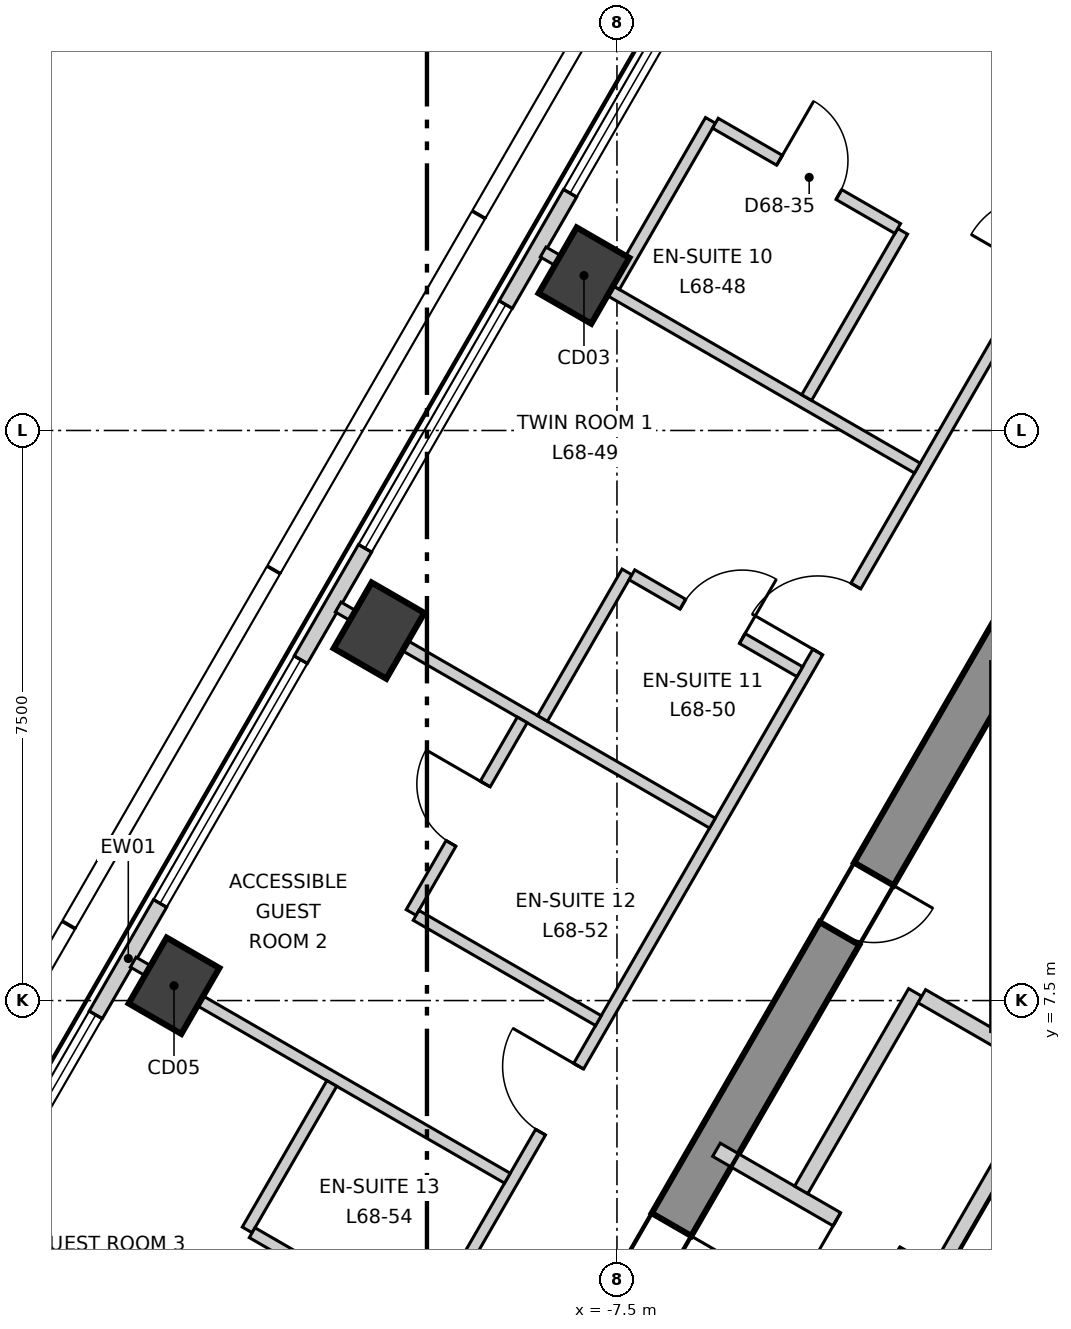
"""IFC4 building model, lengths in metres.
Left out: names, types, materials, properties, quantities, classifications, styles, units other than length and angle.
Written with IfcOpenShell. Run it as: python <this file> out.ifc"""

import sys

from ifc_helpers import new_model, si_unit, direction, frame, frame_2d, origin, origin_2d, place, context, subcontext, project, spatial, polyline, rectangle, outline, extrude, element, fill, save


model = new_model("IFC4")
c1 = context("Model", 3, precision=1e-05, world=origin(), true_north=direction((0.0, 1.0)))
c2 = subcontext(c1, "Body", "Model", "MODEL_VIEW")
j1 = project(units=[si_unit("LENGTHUNIT", "METRE"), si_unit("PLANEANGLEUNIT", "RADIAN")], contexts=[c1])
p1 = place(None, origin())
s1 = spatial("IfcSite", under=j1, at=p1, CompositionType="ELEMENT")
p2 = place(p1, origin())
s2 = spatial("IfcBuilding", under=s1, at=p2, CompositionType="ELEMENT")
p3 = place(p2, frame((0.0, 0.0, 289.9)))
s3 = spatial("IfcBuildingStorey", under=s2, at=p3, CompositionType="ELEMENT", Elevation=289.9)
p4 = place(p3, frame((-1.732, 13.3, -0.3), z_axis=(0.0, 0.0, 1.0), x_axis=(-0.500000539815, -0.866025092122, 0.0)))
e1 = element("IfcWall", 1, at=p4, inside=s3, PredefinedType="SHEAR", context=c2, shape_type="SweptSolid", body=[
    extrude(outline(polyline([(-0.173, -0.3), (1.795, -0.3), (3.763, -0.3), (5.732, -0.3), (7.7, -0.3), (9.668, -0.301), (11.637, -0.301), (13.605, -0.301), (15.573, -0.301), (17.542, -0.301), (19.51, -0.301), (21.478, -0.301), (21.131, 0.3), (19.226, 0.3), (17.321, 0.3), (15.415, 0.3), (13.51, 0.3), (11.605, 0.3), (9.699, 0.3), (7.794, 0.3), (5.889, 0.3), (3.984, 0.3), (2.078, 0.3), (0.173, 0.3), (-0.173, -0.3)])), origin(), (0.0, 0.0, 1.0), 3.6),
])
p5 = place(p4, frame((10.102, 0.0, 0.3)))
e2 = element("IfcOpeningElement", 2, at=p5, cuts=e1, PredefinedType="OPENING", context=c2, shape_type="SweptSolid", body=[
    extrude(rectangle(XDim=1.1, YDim=2.1, at=frame_2d((0.55, 1.05))), frame((0.0, 0.31, 0.0), z_axis=(0.0, -1.0, 0.0), x_axis=(1.0, 0.0, 0.0)), (0.0, 0.0, 1.0), 0.621),
])
p6 = place(p4, frame((16.328, 0.0, 0.3)))
e3 = element("IfcOpeningElement", 3, at=p6, cuts=e1, PredefinedType="OPENING", context=c2, shape_type="SweptSolid", body=[
    extrude(rectangle(XDim=1.0, YDim=2.1, at=frame_2d((0.5, 1.05))), frame((0.0, 0.31, 0.0), z_axis=(0.0, -1.0, 0.0), x_axis=(1.0, 0.0, 0.0)), (0.0, 0.0, 1.0), 0.621),
])
p7 = place(p4, frame((4.777, 0.0, 0.3)))
e4 = element("IfcOpeningElement", 4, at=p7, cuts=e1, PredefinedType="OPENING", context=c2, shape_type="SweptSolid", body=[
    extrude(rectangle(XDim=0.9, YDim=2.1, at=frame_2d((0.45, 1.05))), frame((0.0, 0.31, 0.0), z_axis=(0.0, -1.0, 0.0), x_axis=(1.0, 0.0, 0.0)), (0.0, 0.0, 1.0), 0.621),
])
for number, where, z_axis, x_axis in (
    (5, (-7.934, 17.038, -0.3), (0.0, 0.0, 1.0), (0.5, 0.866, 0.0)),
    (6, (-10.631, 12.367, -0.3), (0.0, 0.0, 1.0), (0.5, 0.866, 0.0)),
    (7, (-13.328, 7.695, -0.3), (0.0, 0.0, 1.0), (0.5, 0.866, 0.0)),
):
    element("IfcColumn", number, at=place(p3, frame(where, z_axis=z_axis, x_axis=x_axis)), inside=s3, PredefinedType="COLUMN", context=c2, shape_type="SweptSolid", body=[
        extrude(rectangle(XDim=1.0, YDim=0.8, at=origin_2d()), origin(), (0.0, 0.0, 1.0), 3.6),
    ])
p8 = place(p3, frame((-2.494, 27.86, 0.0), z_axis=(0.0, 0.0, 1.0), x_axis=(-0.500008134474, -0.866020707292, 0.0)))
e8 = element("IfcWall", 8, at=p8, inside=s3, PredefinedType="ELEMENTEDWALL", context=c2, shape_type="SweptSolid", body=[
    extrude(rectangle(XDim=45.741, YDim=0.2, at=frame_2d((22.871, 0.0))), origin(), (0.0, 0.0, 1.0), 3.3),
])
p9 = place(p8, frame((2.15, 0.0, 0.9)))
e9 = element("IfcOpeningElement", 9, at=p9, cuts=e8, PredefinedType="OPENING", context=c2, shape_type="SweptSolid", body=[
    extrude(rectangle(XDim=3.7, YDim=2.2, at=frame_2d((1.85, 1.1))), frame((0.0, 0.11, 0.0), z_axis=(0.0, -1.0, 0.0), x_axis=(1.0, 0.0, 0.0)), (0.0, 0.0, 1.0), 0.22),
])
p10 = place(p8, frame((7.544, 0.0, 0.9)))
e10 = element("IfcOpeningElement", 10, at=p10, cuts=e8, PredefinedType="OPENING", context=c2, shape_type="SweptSolid", body=[
    extrude(rectangle(XDim=3.7, YDim=2.2, at=frame_2d((1.85, 1.1))), frame((0.0, 0.11, 0.0), z_axis=(0.0, -1.0, 0.0), x_axis=(1.0, 0.0, 0.0)), (0.0, 0.0, 1.0), 0.22),
])
p11 = place(p8, frame((12.939, 0.0, 0.9)))
e11 = element("IfcOpeningElement", 11, at=p11, cuts=e8, PredefinedType="OPENING", context=c2, shape_type="SweptSolid", body=[
    extrude(rectangle(XDim=3.7, YDim=2.2, at=frame_2d((1.85, 1.1))), frame((0.0, 0.11, 0.0), z_axis=(0.0, -1.0, 0.0), x_axis=(1.0, 0.0, 0.0)), (0.0, 0.0, 1.0), 0.22),
])
p12 = place(p8, frame((18.333, 0.0, 0.9)))
e12 = element("IfcOpeningElement", 12, at=p12, cuts=e8, PredefinedType="OPENING", context=c2, shape_type="SweptSolid", body=[
    extrude(rectangle(XDim=3.7, YDim=2.2, at=frame_2d((1.85, 1.1))), frame((0.0, 0.11, 0.0), z_axis=(0.0, -1.0, 0.0), x_axis=(1.0, 0.0, 0.0)), (0.0, 0.0, 1.0), 0.22),
])
p13 = place(p8, frame((23.728, 0.0, 0.9)))
e13 = element("IfcOpeningElement", 13, at=p13, cuts=e8, PredefinedType="OPENING", context=c2, shape_type="SweptSolid", body=[
    extrude(rectangle(XDim=3.7, YDim=2.2, at=frame_2d((1.85, 1.1))), frame((0.0, 0.11, 0.0), z_axis=(0.0, -1.0, 0.0), x_axis=(1.0, 0.0, 0.0)), (0.0, 0.0, 1.0), 0.22),
])
p14 = place(p8, frame((29.122, 0.0, 0.9)))
e14 = element("IfcOpeningElement", 14, at=p14, cuts=e8, PredefinedType="OPENING", context=c2, shape_type="SweptSolid", body=[
    extrude(rectangle(XDim=3.7, YDim=2.2, at=frame_2d((1.85, 1.1))), frame((0.0, 0.11, 0.0), z_axis=(0.0, -1.0, 0.0), x_axis=(1.0, 0.0, 0.0)), (0.0, 0.0, 1.0), 0.22),
])
p15 = place(p8, frame((34.517, 0.0, 0.9)))
e15 = element("IfcOpeningElement", 15, at=p15, cuts=e8, PredefinedType="OPENING", context=c2, shape_type="SweptSolid", body=[
    extrude(rectangle(XDim=3.7, YDim=2.2, at=frame_2d((1.85, 1.1))), frame((0.0, 0.11, 0.0), z_axis=(0.0, -1.0, 0.0), x_axis=(1.0, 0.0, 0.0)), (0.0, 0.0, 1.0), 0.22),
])
p16 = place(p8, frame((39.911, 0.0, 0.9)))
e16 = element("IfcOpeningElement", 16, at=p16, cuts=e8, PredefinedType="OPENING", context=c2, shape_type="SweptSolid", body=[
    extrude(rectangle(XDim=3.7, YDim=2.2, at=frame_2d((1.85, 1.1))), frame((0.0, 0.11, 0.0), z_axis=(0.0, -1.0, 0.0), x_axis=(1.0, 0.0, 0.0)), (0.0, 0.0, 1.0), 0.22),
])
p17 = place(p3, frame((-17.679, -10.12, 0.0), z_axis=(0.0, 0.0, 1.0), x_axis=(0.500008955215, 0.866020233427, 0.0)))
e17 = element("IfcWall", 17, at=p17, inside=s3, PredefinedType="PARTITIONING", context=c2, shape_type="SweptSolid", body=[
    extrude(rectangle(XDim=35.357, YDim=0.15, at=frame_2d((17.679, 0.0))), origin(), (0.0, 0.0, 1.0), 3.3),
])
p18 = place(p17, frame((31.407, 0.0, 0.0)))
e18 = element("IfcOpeningElement", 18, at=p18, cuts=e17, PredefinedType="OPENING", context=c2, shape_type="SweptSolid", body=[
    extrude(rectangle(XDim=1.0, YDim=2.1, at=frame_2d((0.5, 1.05))), frame((0.0, 0.085, 0.0), z_axis=(0.0, -1.0, 0.0), x_axis=(1.0, 0.0, 0.0)), (0.0, 0.0, 1.0), 0.17),
])
p19 = place(p17, frame((25.642, 0.0, 0.0)))
e19 = element("IfcOpeningElement", 19, at=p19, cuts=e17, PredefinedType="OPENING", context=c2, shape_type="SweptSolid", body=[
    extrude(rectangle(XDim=1.0, YDim=2.1, at=frame_2d((0.5, 1.05))), frame((0.0, 0.085, 0.0), z_axis=(0.0, -1.0, 0.0), x_axis=(1.0, 0.0, 0.0)), (0.0, 0.0, 1.0), 0.17),
])
p20 = place(p17, frame((18.348, 0.0, 0.0)))
e20 = element("IfcOpeningElement", 20, at=p20, cuts=e17, PredefinedType="OPENING", context=c2, shape_type="SweptSolid", body=[
    extrude(rectangle(XDim=1.0, YDim=2.1, at=frame_2d((0.5, 1.05))), frame((0.0, 0.085, 0.0), z_axis=(0.0, -1.0, 0.0), x_axis=(1.0, 0.0, 0.0)), (0.0, 0.0, 1.0), 0.17),
])
p21 = place(p17, frame((13.254, 0.0, 0.0)))
e21 = element("IfcOpeningElement", 21, at=p21, cuts=e17, PredefinedType="OPENING", context=c2, shape_type="SweptSolid", body=[
    extrude(rectangle(XDim=1.0, YDim=2.1, at=frame_2d((0.5, 1.05))), frame((0.0, 0.085, 0.0), z_axis=(0.0, -1.0, 0.0), x_axis=(1.0, 0.0, 0.0)), (0.0, 0.0, 1.0), 0.17),
])
p22 = place(p17, frame((7.559, 0.0, 0.0)))
e22 = element("IfcOpeningElement", 22, at=p22, cuts=e17, PredefinedType="OPENING", context=c2, shape_type="SweptSolid", body=[
    extrude(rectangle(XDim=1.0, YDim=2.1, at=frame_2d((0.5, 1.05))), frame((0.0, 0.085, 0.0), z_axis=(0.0, -1.0, 0.0), x_axis=(1.0, 0.0, 0.0)), (0.0, 0.0, 1.0), 0.17),
])
p23 = place(p17, frame((2.865, 0.0, 0.0)))
e23 = element("IfcOpeningElement", 23, at=p23, cuts=e17, PredefinedType="OPENING", context=c2, shape_type="SweptSolid", body=[
    extrude(rectangle(XDim=1.0, YDim=2.1, at=frame_2d((0.5, 1.05))), frame((0.0, 0.085, 0.0), z_axis=(0.0, -1.0, 0.0), x_axis=(1.0, 0.0, 0.0)), (0.0, 0.0, 1.0), 0.17),
])
p24 = place(p3, frame((-13.865, 8.005, 0.0), z_axis=(0.0, 0.0, 1.0), x_axis=(0.86606758311, -0.499926936147, 0.0)))
e24 = element("IfcWall", 24, at=p24, inside=s3, PredefinedType="PARTITIONING", context=c2, shape_type="SweptSolid", body=[
    extrude(rectangle(XDim=5.684, YDim=0.15, at=frame_2d((2.842, 0.0))), origin(), (0.0, 0.0, 1.0), 2.8),
])
p25 = place(p3, frame((-11.168, 12.677, 0.0), z_axis=(0.0, 0.0, 1.0), x_axis=(0.866017549727, -0.50001360338, 0.0)))
e25 = element("IfcWall", 25, at=p25, inside=s3, PredefinedType="PARTITIONING", context=c2, shape_type="SweptSolid", body=[
    extrude(rectangle(XDim=5.686, YDim=0.15, at=frame_2d((2.843, 0.0))), origin(), (0.0, 0.0, 1.0), 3.3),
])
p26 = place(p3, frame((-8.471, 17.348, 0.0), z_axis=(0.0, 0.0, 1.0), x_axis=(0.86596385927, -0.500106583079, 0.0)))
e26 = element("IfcWall", 26, at=p26, inside=s3, PredefinedType="PARTITIONING", context=c2, shape_type="SweptSolid", body=[
    extrude(rectangle(XDim=5.685, YDim=0.15, at=frame_2d((2.842, 0.0))), origin(), (0.0, 0.0, 1.0), 3.3),
])
p27 = place(p3, frame((-5.004, 15.433, 0.0), z_axis=(0.0, 0.0, 1.0), x_axis=(0.500079482444, 0.865979509711, 0.0)))
e27 = element("IfcWall", 27, at=p27, inside=s3, PredefinedType="PARTITIONING", context=c2, shape_type="SweptSolid", body=[
    extrude(rectangle(XDim=2.525, YDim=0.15, at=frame_2d((1.263, 0.0))), origin(), (0.0, 0.0, 1.0), 3.3),
])
p28 = place(p3, frame((-7.533, 16.893, 0.0), z_axis=(0.0, 0.0, 1.0), x_axis=(0.500079482444, 0.865979509711, 0.0)))
e28 = element("IfcWall", 28, at=p28, inside=s3, PredefinedType="PARTITIONING", context=c2, shape_type="SweptSolid", body=[
    extrude(rectangle(XDim=2.525, YDim=0.15, at=frame_2d((1.263, 0.0))), origin(), (0.0, 0.0, 1.0), 2.6),
])
p29 = place(p3, frame((-10.208, 8.659, 0.0), z_axis=(0.0, 0.0, 1.0), x_axis=(0.499874209568, 0.866098016745, 0.0)))
e29 = element("IfcWall", 29, at=p29, inside=s3, PredefinedType="PARTITIONING", context=c2, shape_type="SweptSolid", body=[
    extrude(rectangle(XDim=2.925, YDim=0.15, at=frame_2d((1.462, 0.0))), origin(), (0.0, 0.0, 1.0), 3.3),
])
p30 = place(p29, frame((1.05, 0.0, 0.0)))
e30 = element("IfcOpeningElement", 30, at=p30, cuts=e29, PredefinedType="OPENING", context=c2, shape_type="SweptSolid", body=[
    extrude(rectangle(XDim=0.9, YDim=2.1, at=frame_2d((0.45, 1.05))), frame((0.0, 0.085, 0.0), z_axis=(0.0, -1.0, 0.0), x_axis=(1.0, 0.0, 0.0)), (0.0, 0.0, 1.0), 0.17),
])
p31 = place(p3, frame((-12.365, 4.483, 0.0), z_axis=(0.0, 0.0, 1.0), x_axis=(0.500162441854, 0.865931597621, 0.0)))
e31 = element("IfcWall", 31, at=p31, inside=s3, PredefinedType="PARTITIONING", context=c2, shape_type="SweptSolid", body=[
    extrude(rectangle(XDim=2.225, YDim=0.15, at=frame_2d((1.113, 0.0))), origin(), (0.0, 0.0, 1.0), 3.3),
])
p32 = place(p3, frame((-8.48, 11.212, 0.0), z_axis=(0.0, 0.0, 1.0), x_axis=(0.499833278392, 0.866121639155, 0.0)))
e32 = element("IfcWall", 32, at=p32, inside=s3, PredefinedType="PARTITIONING", context=c2, shape_type="SweptSolid", body=[
    extrude(rectangle(XDim=2.225, YDim=0.15, at=frame_2d((1.112, 0.0))), origin(), (0.0, 0.0, 1.0), 3.3),
])
p33 = place(p3, frame((-12.3, 4.446, 0.0), z_axis=(0.0, 0.0, 1.0), x_axis=(0.865965520905, -0.500103705848, 0.0)))
e33 = element("IfcWall", 33, at=p33, inside=s3, PredefinedType="PARTITIONING", context=c2, shape_type="SweptSolid", body=[
    extrude(rectangle(XDim=2.55, YDim=0.15, at=frame_2d((1.275, 0.0))), origin(), (0.0, 0.0, 1.0), 3.3),
])
p34 = place(p33, frame((0.875, 0.0, 0.0)))
e34 = element("IfcOpeningElement", 34, at=p34, cuts=e33, PredefinedType="OPENING", context=c2, shape_type="SweptSolid", body=[
    extrude(rectangle(XDim=0.9, YDim=2.1, at=frame_2d((0.45, 1.05))), frame((0.0, 0.085, 0.0), z_axis=(0.0, -1.0, 0.0), x_axis=(1.0, 0.0, 0.0)), (0.0, 0.0, 1.0), 0.17),
])
p35 = place(p3, frame((-10.143, 8.621, 0.0), z_axis=(0.0, 0.0, 1.0), x_axis=(0.866049104564, -0.499958946799, 0.0)))
e35 = element("IfcWall", 35, at=p35, inside=s3, PredefinedType="PARTITIONING", context=c2, shape_type="SweptSolid", body=[
    extrude(rectangle(XDim=2.77, YDim=0.15, at=frame_2d((1.385, 0.0))), origin(), (0.0, 0.0, 1.0), 3.3),
])
p36 = place(p3, frame((-6.205, 19.042, 0.0), z_axis=(0.0, 0.0, 1.0), x_axis=(0.866049104564, -0.499958946799, 0.0)))
e36 = element("IfcWall", 36, at=p36, inside=s3, PredefinedType="PARTITIONING", context=c2, shape_type="SweptSolid", body=[
    extrude(rectangle(XDim=2.77, YDim=0.15, at=frame_2d((1.385, 0.0))), origin(), (0.0, 0.0, 1.0), 3.3),
])
p37 = place(p36, frame((0.975, 0.0, 0.0)))
e37 = element("IfcOpeningElement", 37, at=p37, cuts=e36, PredefinedType="OPENING", context=c2, shape_type="SweptSolid", body=[
    extrude(rectangle(XDim=0.9, YDim=2.1, at=frame_2d((0.45, 1.05))), frame((0.0, 0.085, 0.0), z_axis=(0.0, -1.0, 0.0), x_axis=(1.0, 0.0, 0.0)), (0.0, 0.0, 1.0), 0.17),
])
p38 = place(p3, frame((-7.303, 13.101, 0.0), z_axis=(0.0, 0.0, 1.0), x_axis=(0.866061263272, -0.499937884402, 0.0)))
e38 = element("IfcWall", 38, at=p38, inside=s3, PredefinedType="PARTITIONING", context=c2, shape_type="SweptSolid", body=[
    extrude(rectangle(XDim=2.551, YDim=0.15, at=frame_2d((1.275, 0.0))), origin(), (0.0, 0.0, 1.0), 3.3),
])
p39 = place(p38, frame((0.775, 0.0, 0.0)))
e39 = element("IfcOpeningElement", 39, at=p39, cuts=e38, PredefinedType="OPENING", context=c2, shape_type="SweptSolid", body=[
    extrude(rectangle(XDim=0.9, YDim=2.1, at=frame_2d((0.45, 1.05))), frame((0.0, 0.085, 0.0), z_axis=(0.0, -1.0, 0.0), x_axis=(1.0, 0.0, 0.0)), (0.0, 0.0, 1.0), 0.17),
])
p40 = place(p3, frame((-6.191, 5.537, 0.0), z_axis=(0.0, 0.0, 1.0), x_axis=(0.866052607023, -0.499952879648, 0.0)))
e40 = element("IfcWall", 40, at=p40, inside=s3, PredefinedType="SOLIDWALL", context=c2, shape_type="SweptSolid", body=[
    extrude(rectangle(XDim=3.332, YDim=0.2, at=frame_2d((1.666, 0.0))), origin(), (0.0, 0.0, 1.0), 3.3),
])
p41 = place(p40, frame((1.83, 0.0, 0.0)))
e41 = element("IfcOpeningElement", 41, at=p41, cuts=e40, PredefinedType="OPENING", context=c2, shape_type="SweptSolid", body=[
    extrude(rectangle(XDim=0.9, YDim=2.1, at=frame_2d((0.45, 1.05))), frame((0.0, 0.11, 0.0), z_axis=(0.0, -1.0, 0.0), x_axis=(1.0, 0.0, 0.0)), (0.0, 0.0, 1.0), 0.22),
])
p42 = place(p3, frame((-5.076, 5.009, 0.0), z_axis=(0.0, 0.0, 1.0), x_axis=(0.50002537861, 0.866010750942, 0.0)))
e42 = element("IfcWall", 42, at=p42, inside=s3, PredefinedType="SOLIDWALL", context=c2, shape_type="SweptSolid", body=[
    extrude(rectangle(XDim=3.0, YDim=0.2, at=frame_2d((1.5, 0.0))), origin(), (0.0, 0.0, 1.0), 3.3),
])
p43 = place(p3, frame((-3.489, 7.557, 0.0), z_axis=(0.0, 0.0, 1.0), x_axis=(0.866010750942, -0.50002537861, 0.0)))
e43 = element("IfcWall", 43, at=p43, inside=s3, PredefinedType="SOLIDWALL", context=c2, shape_type="SweptSolid", body=[
    extrude(rectangle(XDim=2.0, YDim=0.2, at=frame_2d((1.0, 0.0))), origin(), (0.0, 0.0, 1.0), 3.3),
])
p44 = place(p3, frame((-3.257, 3.959, 0.0), z_axis=(0.0, 0.0, 1.0), x_axis=(0.50012328804, 0.865954211699, 0.0)))
e44 = element("IfcWall", 44, at=p44, inside=s3, PredefinedType="SOLIDWALL", context=c2, shape_type="SweptSolid", body=[
    extrude(rectangle(XDim=2.9, YDim=0.2, at=frame_2d((1.45, 0.0))), origin(), (0.0, 0.0, 1.0), 3.3),
])
p45 = place(p10, origin())
e45 = element("IfcWindow", 45, at=p45, inside=s3, PartitioningType="SINGLE_PANEL", PredefinedType="WINDOW", context=c2, shape_type="SweptSolid", body=[
    extrude(rectangle(XDim=3.7, YDim=2.2, at=frame_2d((1.85, 1.1))), frame((0.0, 0.03, 0.0), z_axis=(0.0, -1.0, 0.0), x_axis=(1.0, 0.0, 0.0)), (0.0, 0.0, 1.0), 0.06),
])
fill(e10, e45)
p46 = place(p11, origin())
e46 = element("IfcWindow", 46, at=p46, inside=s3, PartitioningType="SINGLE_PANEL", PredefinedType="WINDOW", context=c2, shape_type="SweptSolid", body=[
    extrude(rectangle(XDim=3.7, YDim=2.2, at=frame_2d((1.85, 1.1))), frame((0.0, 0.03, 0.0), z_axis=(0.0, -1.0, 0.0), x_axis=(1.0, 0.0, 0.0)), (0.0, 0.0, 1.0), 0.06),
])
fill(e11, e46)
p47 = place(p12, origin())
e47 = element("IfcWindow", 47, at=p47, inside=s3, PartitioningType="SINGLE_PANEL", PredefinedType="WINDOW", context=c2, shape_type="SweptSolid", body=[
    extrude(rectangle(XDim=3.7, YDim=2.2, at=frame_2d((1.85, 1.1))), frame((0.0, 0.03, 0.0), z_axis=(0.0, -1.0, 0.0), x_axis=(1.0, 0.0, 0.0)), (0.0, 0.0, 1.0), 0.06),
])
fill(e12, e47)
p48 = place(p13, origin())
e48 = element("IfcWindow", 48, at=p48, inside=s3, PartitioningType="SINGLE_PANEL", PredefinedType="WINDOW", context=c2, shape_type="SweptSolid", body=[
    extrude(rectangle(XDim=3.7, YDim=2.2, at=frame_2d((1.85, 1.1))), frame((0.0, 0.03, 0.0), z_axis=(0.0, -1.0, 0.0), x_axis=(1.0, 0.0, 0.0)), (0.0, 0.0, 1.0), 0.06),
])
fill(e13, e48)
p49 = place(p41, origin())
e49 = element("IfcDoor", 49, at=p49, inside=s3, OperationType="SINGLE_SWING_LEFT", PredefinedType="DOOR", context=c2, shape_type="SweptSolid", body=[
    extrude(rectangle(XDim=0.9, YDim=2.1, at=frame_2d((0.45, 1.05))), frame((0.0, 0.025, 0.0), z_axis=(0.0, -1.0, 0.0), x_axis=(1.0, 0.0, 0.0)), (0.0, 0.0, 1.0), 0.05),
])
fill(e41, e49)
p50 = place(p37, origin())
e50 = element("IfcDoor", 50, at=p50, inside=s3, OperationType="SINGLE_SWING_RIGHT", PredefinedType="DOOR", context=c2, shape_type="SweptSolid", body=[
    extrude(rectangle(XDim=0.9, YDim=2.1, at=frame_2d((0.45, 1.05))), frame((0.0, 0.025, 0.0), z_axis=(0.0, -1.0, 0.0), x_axis=(1.0, 0.0, 0.0)), (0.0, 0.0, 1.0), 0.05),
])
fill(e37, e50)
p51 = place(p19, origin())
e51 = element("IfcDoor", 51, at=p51, inside=s3, OperationType="SINGLE_SWING_RIGHT", PredefinedType="DOOR", context=c2, shape_type="SweptSolid", body=[
    extrude(rectangle(XDim=1.0, YDim=2.1, at=frame_2d((0.5, 1.05))), frame((0.0, 0.025, 0.0), z_axis=(0.0, -1.0, 0.0), x_axis=(1.0, 0.0, 0.0)), (0.0, 0.0, 1.0), 0.05),
])
fill(e19, e51)
p52 = place(p39, origin())
e52 = element("IfcDoor", 52, at=p52, inside=s3, OperationType="SINGLE_SWING_LEFT", PredefinedType="DOOR", context=c2, shape_type="SweptSolid", body=[
    extrude(rectangle(XDim=0.9, YDim=2.1, at=frame_2d((0.45, 1.05))), frame((0.0, 0.025, 0.0), z_axis=(0.0, -1.0, 0.0), x_axis=(1.0, 0.0, 0.0)), (0.0, 0.0, 1.0), 0.05),
])
fill(e39, e52)
p53 = place(p20, origin())
e53 = element("IfcDoor", 53, at=p53, inside=s3, OperationType="SINGLE_SWING_LEFT", PredefinedType="DOOR", context=c2, shape_type="SweptSolid", body=[
    extrude(rectangle(XDim=1.0, YDim=2.1, at=frame_2d((0.5, 1.05))), frame((0.0, 0.025, 0.0), z_axis=(0.0, -1.0, 0.0), x_axis=(1.0, 0.0, 0.0)), (0.0, 0.0, 1.0), 0.05),
])
fill(e20, e53)
p54 = place(p30, origin())
e54 = element("IfcDoor", 54, at=p54, inside=s3, OperationType="SINGLE_SWING_LEFT", PredefinedType="DOOR", context=c2, shape_type="SweptSolid", body=[
    extrude(rectangle(XDim=0.9, YDim=2.1, at=frame_2d((0.45, 1.05))), frame((0.0, 0.025, 0.0), z_axis=(0.0, -1.0, 0.0), x_axis=(1.0, 0.0, 0.0)), (0.0, 0.0, 1.0), 0.05),
])
fill(e30, e54)
p55 = place(p5, origin())
e55 = element("IfcDoor", 55, at=p55, inside=s3, OperationType="SINGLE_SWING_RIGHT", PredefinedType="DOOR", context=c2, shape_type="SweptSolid", body=[
    extrude(rectangle(XDim=1.1, YDim=2.1, at=frame_2d((0.55, 1.05))), frame((0.0, 0.025, 0.0), z_axis=(0.0, -1.0, 0.0), x_axis=(1.0, 0.0, 0.0)), (0.0, 0.0, 1.0), 0.05),
])
fill(e2, e55)
p56 = place(p7, origin())
e56 = element("IfcDoor", 56, at=p56, inside=s3, OperationType="SINGLE_SWING_RIGHT", PredefinedType="DOOR", context=c2, shape_type="SweptSolid", body=[
    extrude(rectangle(XDim=0.9, YDim=2.1, at=frame_2d((0.45, 1.05))), frame((0.0, 0.025, 0.0), z_axis=(0.0, -1.0, 0.0), x_axis=(1.0, 0.0, 0.0)), (0.0, 0.0, 1.0), 0.05),
])
fill(e4, e56)
save(model, sys.argv[1])
